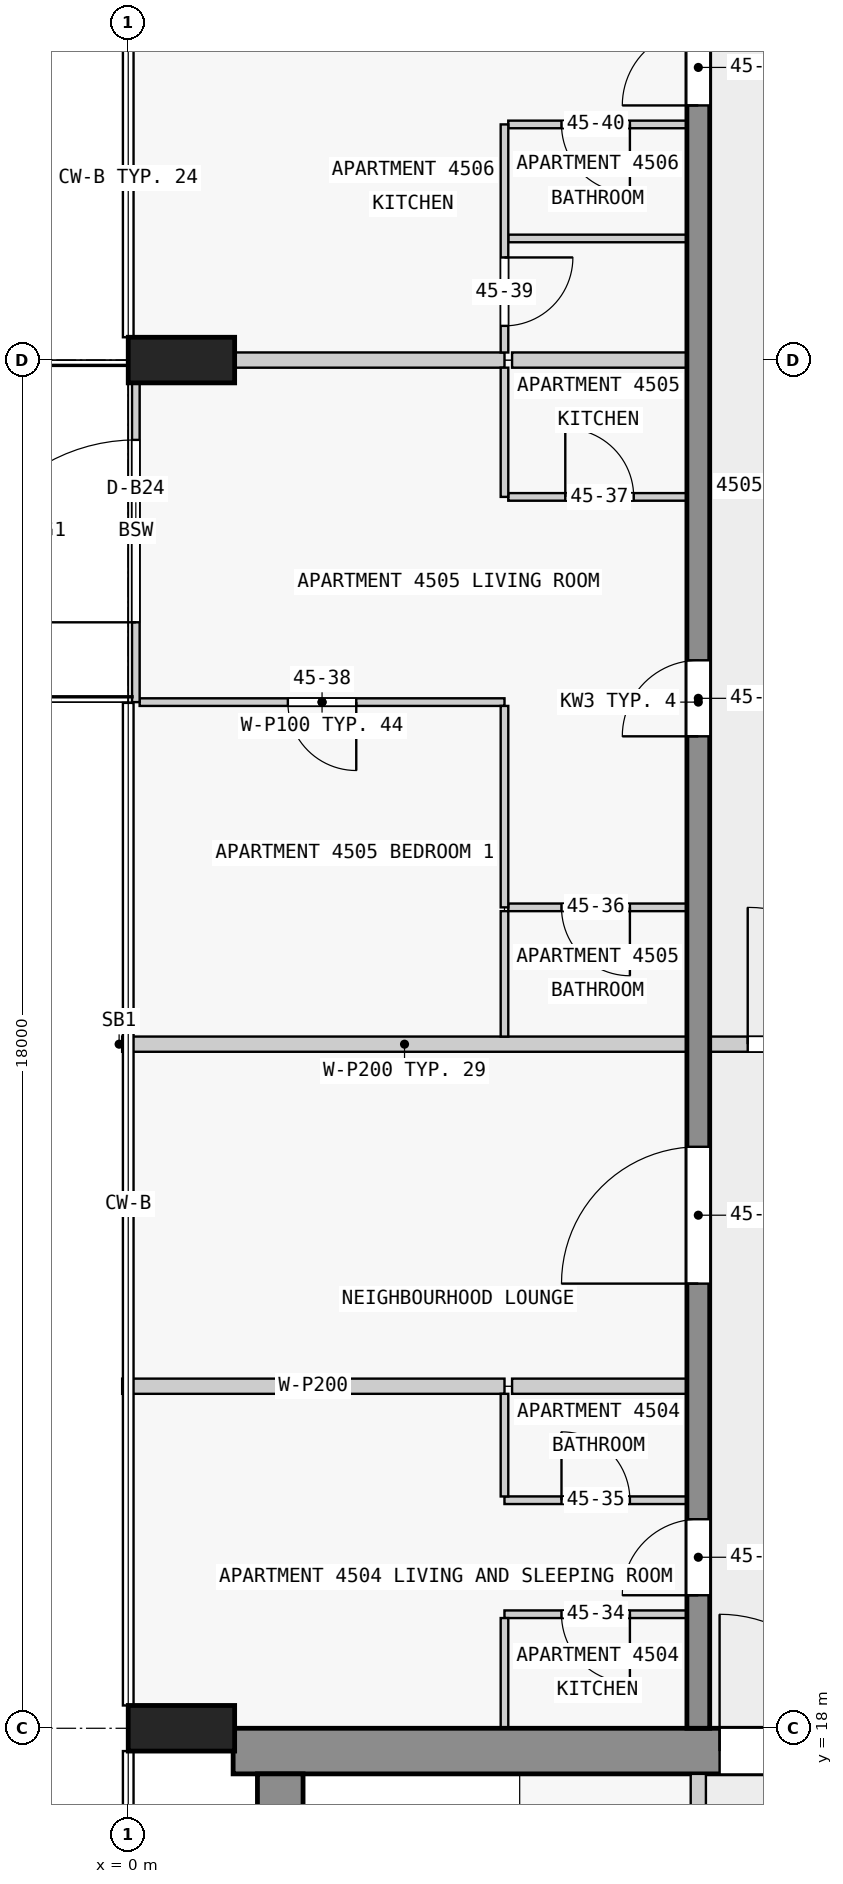
"""IFC4 building model, lengths in metres.
Left out: names, types, materials, properties, quantities, classifications, styles, units other than length and angle.
Written with IfcOpenShell. Run it as: python <this file> out.ifc"""

import sys

from ifc_helpers import new_model, si_unit, direction, frame, frame_2d, origin, origin_2d, place, context, subcontext, project, spatial, rectangle, extrude, element, fill, save


model = new_model("IFC4")
c1 = context("Model", 3, precision=1e-05, world=origin(), true_north=direction((0.0, 1.0)))
c2 = subcontext(c1, "Body", "Model", "MODEL_VIEW")
j1 = project(units=[si_unit("LENGTHUNIT", "METRE"), si_unit("PLANEANGLEUNIT", "RADIAN")], contexts=[c1])
p1 = place(None, origin())
s1 = spatial("IfcSite", under=j1, at=p1, CompositionType="ELEMENT")
p2 = place(p1, origin())
s2 = spatial("IfcBuilding", under=s1, at=p2, CompositionType="ELEMENT")
p3 = place(p2, frame((0.0, 0.0, 174.4)))
s3 = spatial("IfcBuildingStorey", under=s2, at=p3, CompositionType="ELEMENT", Elevation=174.4)
for number, where, z_axis, x_axis in (
    (1, (0.7, 36.0, 0.0), (0.0, 0.0, 1.0), (0.0, 1.0, 0.0)),
    (2, (0.7, 18.0, 0.0), (0.0, 0.0, 1.0), (0.0, 1.0, 0.0)),
):
    element("IfcColumn", number, at=place(p3, frame(where, z_axis=z_axis, x_axis=x_axis)), inside=s3, PredefinedType="COLUMN", context=c2, shape_type="SweptSolid", body=[
        extrude(rectangle(XDim=0.6, YDim=1.4, at=origin_2d()), origin(), (0.0, 0.0, 1.0), 3.5),
    ])
p4 = place(p3, frame((1.38, 17.7, 0.0), z_axis=(0.0, 0.0, 1.0), x_axis=(1.0, 0.0, 0.0)))
e3 = element("IfcWall", 3, at=p4, inside=s3, PredefinedType="SHEAR", context=c2, shape_type="SweptSolid", body=[
    extrude(rectangle(XDim=21.12, YDim=0.6, at=frame_2d((10.56, 0.0))), origin(), (0.0, 0.0, 1.0), 3.25),
])
p5 = place(p4, frame((6.4, 0.0, 0.0)))
e4 = element("IfcOpeningElement", 4, at=p5, cuts=e3, PredefinedType="OPENING", context=c2, shape_type="SweptSolid", body=[
    extrude(rectangle(XDim=1.8, YDim=2.1, at=frame_2d((0.9, 1.05))), frame((0.0, 0.31, 0.0), z_axis=(0.0, -1.0, 0.0), x_axis=(1.0, 0.0, 0.0)), (0.0, 0.0, 1.0), 0.62),
])
p6 = place(p3, frame((2.0, 2.5, 0.0), z_axis=(0.0, 0.0, 1.0), x_axis=(0.0, 1.0, 0.0)))
e5 = element("IfcWall", 5, at=p6, inside=s3, PredefinedType="SHEAR", context=c2, shape_type="SweptSolid", body=[
    extrude(rectangle(XDim=14.9, YDim=0.6, at=frame_2d((7.45, 0.0))), origin(), (0.0, 0.0, 1.0), 3.25),
])
p7 = place(p3, frame((7.5, 18.0, 0.0), z_axis=(0.0, 0.0, 1.0), x_axis=(0.0, 1.0, 0.0)))
e6 = element("IfcWall", 6, at=p7, inside=s3, PredefinedType="SHEAR", context=c2, shape_type="SweptSolid", body=[
    extrude(rectangle(XDim=27.0, YDim=0.3, at=frame_2d((13.5, 0.0))), origin(), (0.0, 0.0, 1.0), 3.25),
])
p8 = place(p7, frame((1.75, 0.0, 0.0)))
e7 = element("IfcOpeningElement", 7, at=p8, cuts=e6, PredefinedType="OPENING", context=c2, shape_type="SweptSolid", body=[
    extrude(rectangle(XDim=1.0, YDim=2.1, at=frame_2d((0.5, 1.05))), frame((0.0, 0.16, 0.0), z_axis=(0.0, -1.0, 0.0), x_axis=(1.0, 0.0, 0.0)), (0.0, 0.0, 1.0), 0.32),
])
p9 = place(p7, frame((5.85, 0.0, 0.0)))
e8 = element("IfcOpeningElement", 8, at=p9, cuts=e6, PredefinedType="OPENING", context=c2, shape_type="SweptSolid", body=[
    extrude(rectangle(XDim=1.8, YDim=2.1, at=frame_2d((0.9, 1.05))), frame((0.0, 0.16, 0.0), z_axis=(0.0, -1.0, 0.0), x_axis=(1.0, 0.0, 0.0)), (0.0, 0.0, 1.0), 0.32),
])
p10 = place(p7, frame((13.05, 0.0, 0.0)))
e9 = element("IfcOpeningElement", 9, at=p10, cuts=e6, PredefinedType="OPENING", context=c2, shape_type="SweptSolid", body=[
    extrude(rectangle(XDim=1.0, YDim=2.1, at=frame_2d((0.5, 1.05))), frame((0.0, 0.16, 0.0), z_axis=(0.0, -1.0, 0.0), x_axis=(1.0, 0.0, 0.0)), (0.0, 0.0, 1.0), 0.32),
])
p11 = place(p7, frame((21.35, 0.0, 0.0)))
e10 = element("IfcOpeningElement", 10, at=p11, cuts=e6, PredefinedType="OPENING", context=c2, shape_type="SweptSolid", body=[
    extrude(rectangle(XDim=1.0, YDim=2.1, at=frame_2d((0.5, 1.05))), frame((0.0, 0.16, 0.0), z_axis=(0.0, -1.0, 0.0), x_axis=(1.0, 0.0, 0.0)), (0.0, 0.0, 1.0), 0.32),
])
p12 = place(p3, frame((0.1, 31.5, 0.0), z_axis=(0.0, 0.0, 1.0), x_axis=(0.0, 1.0, 0.0)))
e11 = element("IfcWall", 11, at=p12, inside=s3, PredefinedType="STANDARD", context=c2, shape_type="SweptSolid", body=[
    extrude(rectangle(XDim=4.5, YDim=0.1, at=frame_2d((2.25, 0.0))), origin(), (0.0, 0.0, 1.0), 3.25),
])
p13 = place(p12, frame((1.05, 0.0, 0.0)))
e12 = element("IfcOpeningElement", 12, at=p13, cuts=e11, PredefinedType="OPENING", context=c2, shape_type="SweptSolid", body=[
    extrude(rectangle(XDim=2.4, YDim=2.4, at=frame_2d((1.2, 1.2))), frame((0.0, 0.06, 0.0), z_axis=(0.0, -1.0, 0.0), x_axis=(1.0, 0.0, 0.0)), (0.0, 0.0, 1.0), 0.12),
])
p14 = place(p3, frame((7.5, 10.1, 0.0), z_axis=(0.0, 0.0, 1.0), x_axis=(0.0, 1.0, 0.0)))
e13 = element("IfcWall", 13, at=p14, inside=s3, PredefinedType="PARTITIONING", context=c2, shape_type="SweptSolid", body=[
    extrude(rectangle(XDim=7.3, YDim=0.2, at=frame_2d((3.65, 0.0))), origin(), (0.0, 0.0, 1.0), 3.25),
])
p15 = place(p14, frame((0.775, 0.0, 0.0)))
e14 = element("IfcOpeningElement", 14, at=p15, cuts=e13, PredefinedType="OPENING", context=c2, shape_type="SweptSolid", body=[
    extrude(rectangle(XDim=0.9, YDim=2.1, at=frame_2d((0.45, 1.05))), frame((0.0, 0.11, 0.0), z_axis=(0.0, -1.0, 0.0), x_axis=(1.0, 0.0, 0.0)), (0.0, 0.0, 1.0), 0.22),
])
p16 = place(p14, frame((3.225, 0.0, 0.0)))
e15 = element("IfcOpeningElement", 15, at=p16, cuts=e13, PredefinedType="OPENING", context=c2, shape_type="SweptSolid", body=[
    extrude(rectangle(XDim=0.9, YDim=2.1, at=frame_2d((0.45, 1.05))), frame((0.0, 0.11, 0.0), z_axis=(0.0, -1.0, 0.0), x_axis=(1.0, 0.0, 0.0)), (0.0, 0.0, 1.0), 0.22),
])
p17 = place(p14, frame((5.25, 0.0, 0.0)))
e16 = element("IfcOpeningElement", 16, at=p17, cuts=e13, PredefinedType="OPENING", context=c2, shape_type="SweptSolid", body=[
    extrude(rectangle(XDim=0.9, YDim=2.1, at=frame_2d((0.45, 1.05))), frame((0.0, 0.11, 0.0), z_axis=(0.0, -1.0, 0.0), x_axis=(1.0, 0.0, 0.0)), (0.0, 0.0, 1.0), 0.22),
])
p18 = place(p3, frame((7.35, 19.5, 0.0), z_axis=(0.0, 0.0, 1.0), x_axis=(-1.0, 0.0, 0.0)))
e17 = element("IfcWall", 17, at=p18, inside=s3, PredefinedType="PARTITIONING", context=c2, shape_type="SweptSolid", body=[
    extrude(rectangle(XDim=2.4, YDim=0.1, at=frame_2d((1.2, 0.0))), origin(), (0.0, 0.0, 1.0), 3.25),
])
p19 = place(p18, frame((0.75, 0.0, 0.0)))
e18 = element("IfcOpeningElement", 18, at=p19, cuts=e17, PredefinedType="OPENING", context=c2, shape_type="SweptSolid", body=[
    extrude(rectangle(XDim=0.9, YDim=2.1, at=frame_2d((0.45, 1.05))), frame((0.0, 0.06, 0.0), z_axis=(0.0, -1.0, 0.0), x_axis=(1.0, 0.0, 0.0)), (0.0, 0.0, 1.0), 0.12),
])
p20 = place(p3, frame((4.95, 21.0, 0.0), z_axis=(0.0, 0.0, 1.0), x_axis=(1.0, 0.0, 0.0)))
e19 = element("IfcWall", 19, at=p20, inside=s3, PredefinedType="PARTITIONING", context=c2, shape_type="SweptSolid", body=[
    extrude(rectangle(XDim=2.4, YDim=0.1, at=frame_2d((1.2, 0.0))), origin(), (0.0, 0.0, 1.0), 3.25),
])
p21 = place(p20, frame((0.75, 0.0, 0.0)))
e20 = element("IfcOpeningElement", 20, at=p21, cuts=e19, PredefinedType="OPENING", context=c2, shape_type="SweptSolid", body=[
    extrude(rectangle(XDim=0.9, YDim=2.1, at=frame_2d((0.45, 1.05))), frame((0.0, 0.06, 0.0), z_axis=(0.0, -1.0, 0.0), x_axis=(1.0, 0.0, 0.0)), (0.0, 0.0, 1.0), 0.12),
])
p22 = place(p3, frame((7.35, 22.5, 0.0), z_axis=(0.0, 0.0, 1.0), x_axis=(-1.0, 0.0, 0.0)))
e21 = element("IfcWall", 21, at=p22, inside=s3, PredefinedType="PARTITIONING", context=c2, shape_type="SweptSolid", body=[
    extrude(rectangle(XDim=2.3, YDim=0.2, at=frame_2d((1.15, 0.0))), origin(), (0.0, 0.0, 1.0), 3.25),
])
p23 = place(p3, frame((-0.08, 22.5, 0.0), z_axis=(0.0, 0.0, 1.0), x_axis=(1.0, 0.0, 0.0)))
e22 = element("IfcWall", 22, at=p23, inside=s3, PredefinedType="PARTITIONING", context=c2, shape_type="SweptSolid", body=[
    extrude(rectangle(XDim=5.03, YDim=0.2, at=frame_2d((2.515, 0.0))), origin(), (0.0, 0.0, 1.0), 3.25),
])
p24 = place(p3, frame((7.35, 27.0, 0.0), z_axis=(0.0, 0.0, 1.0), x_axis=(-1.0, 0.0, 0.0)))
e23 = element("IfcWall", 23, at=p24, inside=s3, PredefinedType="PARTITIONING", context=c2, shape_type="SweptSolid", body=[
    extrude(rectangle(XDim=7.43, YDim=0.2, at=frame_2d((3.715, 0.0))), origin(), (0.0, 0.0, 1.0), 3.25),
])
p25 = place(p3, frame((7.35, 28.8, 0.0), z_axis=(0.0, 0.0, 1.0), x_axis=(-1.0, 0.0, 0.0)))
e24 = element("IfcWall", 24, at=p25, inside=s3, PredefinedType="PARTITIONING", context=c2, shape_type="SweptSolid", body=[
    extrude(rectangle(XDim=2.35, YDim=0.1, at=frame_2d((1.175, 0.0))), origin(), (0.0, 0.0, 1.0), 3.25),
])
p26 = place(p25, frame((0.75, 0.0, 0.0)))
e25 = element("IfcOpeningElement", 25, at=p26, cuts=e24, PredefinedType="OPENING", context=c2, shape_type="SweptSolid", body=[
    extrude(rectangle(XDim=0.9, YDim=2.1, at=frame_2d((0.45, 1.05))), frame((0.0, 0.06, 0.0), z_axis=(0.0, -1.0, 0.0), x_axis=(1.0, 0.0, 0.0)), (0.0, 0.0, 1.0), 0.12),
])
p27 = place(p3, frame((4.95, 31.5, 0.0), z_axis=(0.0, 0.0, 1.0), x_axis=(-1.0, 0.0, 0.0)))
e26 = element("IfcWall", 26, at=p27, inside=s3, PredefinedType="PARTITIONING", context=c2, shape_type="SweptSolid", body=[
    extrude(rectangle(XDim=4.8, YDim=0.1, at=frame_2d((2.4, 0.0))), origin(), (0.0, 0.0, 1.0), 3.25),
])
p28 = place(p27, frame((1.95, 0.0, 0.0)))
e27 = element("IfcOpeningElement", 27, at=p28, cuts=e26, PredefinedType="OPENING", context=c2, shape_type="SweptSolid", body=[
    extrude(rectangle(XDim=0.9, YDim=2.1, at=frame_2d((0.45, 1.05))), frame((0.0, 0.06, 0.0), z_axis=(0.0, -1.0, 0.0), x_axis=(1.0, 0.0, 0.0)), (0.0, 0.0, 1.0), 0.12),
])
p29 = place(p3, frame((5.0, 34.2, 0.0), z_axis=(0.0, 0.0, 1.0), x_axis=(1.0, 0.0, 0.0)))
e28 = element("IfcWall", 28, at=p29, inside=s3, PredefinedType="PARTITIONING", context=c2, shape_type="SweptSolid", body=[
    extrude(rectangle(XDim=2.35, YDim=0.1, at=frame_2d((1.175, 0.0))), origin(), (0.0, 0.0, 1.0), 3.25),
])
p30 = place(p29, frame((0.75, 0.0, 0.0)))
e29 = element("IfcOpeningElement", 29, at=p30, cuts=e28, PredefinedType="OPENING", context=c2, shape_type="SweptSolid", body=[
    extrude(rectangle(XDim=0.9, YDim=2.1, at=frame_2d((0.45, 1.05))), frame((0.0, 0.06, 0.0), z_axis=(0.0, -1.0, 0.0), x_axis=(1.0, 0.0, 0.0)), (0.0, 0.0, 1.0), 0.12),
])
p31 = place(p3, frame((7.35, 36.0, 0.0), z_axis=(0.0, 0.0, 1.0), x_axis=(-1.0, 0.0, 0.0)))
e30 = element("IfcWall", 30, at=p31, inside=s3, PredefinedType="PARTITIONING", context=c2, shape_type="SweptSolid", body=[
    extrude(rectangle(XDim=2.3, YDim=0.2, at=frame_2d((1.15, 0.0))), origin(), (0.0, 0.0, 1.0), 3.25),
])
p32 = place(p3, frame((1.4, 36.0, 0.0), z_axis=(0.0, 0.0, 1.0), x_axis=(1.0, 0.0, 0.0)))
e31 = element("IfcWall", 31, at=p32, inside=s3, PredefinedType="PARTITIONING", context=c2, shape_type="SweptSolid", body=[
    extrude(rectangle(XDim=3.55, YDim=0.2, at=frame_2d((1.775, 0.0))), origin(), (0.0, 0.0, 1.0), 3.25),
])
p33 = place(p3, frame((7.35, 37.6, 0.0), z_axis=(0.0, 0.0, 1.0), x_axis=(-1.0, 0.0, 0.0)))
e32 = element("IfcWall", 32, at=p33, inside=s3, PredefinedType="PARTITIONING", context=c2, shape_type="SweptSolid", body=[
    extrude(rectangle(XDim=2.35, YDim=0.1, at=frame_2d((1.175, 0.0))), origin(), (0.0, 0.0, 1.0), 3.25),
])
p34 = place(p3, frame((7.35, 39.1, 0.0), z_axis=(0.0, 0.0, 1.0), x_axis=(-1.0, 0.0, 0.0)))
e33 = element("IfcWall", 33, at=p34, inside=s3, PredefinedType="PARTITIONING", context=c2, shape_type="SweptSolid", body=[
    extrude(rectangle(XDim=2.35, YDim=0.1, at=frame_2d((1.175, 0.0))), origin(), (0.0, 0.0, 1.0), 3.25),
])
p35 = place(p34, frame((0.75, 0.0, 0.0)))
e34 = element("IfcOpeningElement", 34, at=p35, cuts=e33, PredefinedType="OPENING", context=c2, shape_type="SweptSolid", body=[
    extrude(rectangle(XDim=0.9, YDim=2.1, at=frame_2d((0.45, 1.05))), frame((0.0, 0.06, 0.0), z_axis=(0.0, -1.0, 0.0), x_axis=(1.0, 0.0, 0.0)), (0.0, 0.0, 1.0), 0.12),
])
p36 = place(p3, frame((4.95, 19.45, 0.0), z_axis=(0.0, 0.0, 1.0), x_axis=(0.0, -1.0, 0.0)))
e35 = element("IfcWall", 35, at=p36, inside=s3, PredefinedType="PARTITIONING", context=c2, shape_type="SweptSolid", body=[
    extrude(rectangle(XDim=1.45, YDim=0.1, at=frame_2d((0.725, 0.0))), origin(), (0.0, 0.0, 1.0), 3.25),
])
p37 = place(p3, frame((4.95, 22.4, 0.0), z_axis=(0.0, 0.0, 1.0), x_axis=(0.0, -1.0, 0.0)))
e36 = element("IfcWall", 36, at=p37, inside=s3, PredefinedType="PARTITIONING", context=c2, shape_type="SweptSolid", body=[
    extrude(rectangle(XDim=1.35, YDim=0.1, at=frame_2d((0.675, 0.0))), origin(), (0.0, 0.0, 1.0), 3.25),
])
p38 = place(p3, frame((4.95, 28.75, 0.0), z_axis=(0.0, 0.0, 1.0), x_axis=(0.0, -1.0, 0.0)))
e37 = element("IfcWall", 37, at=p38, inside=s3, PredefinedType="PARTITIONING", context=c2, shape_type="SweptSolid", body=[
    extrude(rectangle(XDim=1.65, YDim=0.1, at=frame_2d((0.825, 0.0))), origin(), (0.0, 0.0, 1.0), 3.25),
])
p39 = place(p3, frame((4.95, 35.9, 0.0), z_axis=(0.0, 0.0, 1.0), x_axis=(0.0, -1.0, 0.0)))
e38 = element("IfcWall", 38, at=p39, inside=s3, PredefinedType="PARTITIONING", context=c2, shape_type="SweptSolid", body=[
    extrude(rectangle(XDim=1.7, YDim=0.1, at=frame_2d((0.85, 0.0))), origin(), (0.0, 0.0, 1.0), 3.25),
])
p40 = place(p3, frame((4.95, 39.1, 0.0), z_axis=(0.0, 0.0, 1.0), x_axis=(0.0, -1.0, 0.0)))
e39 = element("IfcWall", 39, at=p40, inside=s3, PredefinedType="PARTITIONING", context=c2, shape_type="SweptSolid", body=[
    extrude(rectangle(XDim=3.0, YDim=0.1, at=frame_2d((1.5, 0.0))), origin(), (0.0, 0.0, 1.0), 3.25),
])
p41 = place(p40, frame((1.75, 0.0, 0.0)))
e40 = element("IfcOpeningElement", 40, at=p41, cuts=e39, PredefinedType="OPENING", context=c2, shape_type="SweptSolid", body=[
    extrude(rectangle(XDim=0.9, YDim=2.1, at=frame_2d((0.45, 1.05))), frame((0.0, 0.06, 0.0), z_axis=(0.0, -1.0, 0.0), x_axis=(1.0, 0.0, 0.0)), (0.0, 0.0, 1.0), 0.12),
])
p42 = place(p3, frame((4.95, 28.8, 0.0), z_axis=(0.0, 0.0, 1.0), x_axis=(0.0, 1.0, 0.0)))
e41 = element("IfcWall", 41, at=p42, inside=s3, PredefinedType="PARTITIONING", context=c2, shape_type="SweptSolid", body=[
    extrude(rectangle(XDim=2.65, YDim=0.1, at=frame_2d((1.325, 0.0))), origin(), (0.0, 0.0, 1.0), 3.25),
])
p43 = place(p3, frame((7.45, 27.0, 0.0), z_axis=(0.0, 0.0, 1.0), x_axis=(1.0, 0.0, 0.0)))
e42 = element("IfcWall", 42, at=p43, inside=s3, PredefinedType="PARTITIONING", context=c2, shape_type="SweptSolid", body=[
    extrude(rectangle(XDim=3.2, YDim=0.2, at=frame_2d((1.6, 0.0))), origin(), (0.0, 0.0, 1.0), 3.25),
])
p44 = place(p43, frame((0.7, 0.0, 0.0)))
e43 = element("IfcOpeningElement", 43, at=p44, cuts=e42, PredefinedType="OPENING", context=c2, shape_type="SweptSolid", body=[
    extrude(rectangle(XDim=1.8, YDim=2.1, at=frame_2d((0.9, 1.05))), frame((0.0, 0.11, 0.0), z_axis=(0.0, -1.0, 0.0), x_axis=(1.0, 0.0, 0.0)), (0.0, 0.0, 1.0), 0.22),
])
p45 = place(p13, origin())
e44 = element("IfcDoor", 44, at=p45, inside=s3, OperationType="SINGLE_SWING_LEFT", PredefinedType="DOOR", context=c2, shape_type="SweptSolid", body=[
    extrude(rectangle(XDim=2.4, YDim=2.4, at=frame_2d((1.2, 1.2))), frame((0.0, 0.025, 0.0), z_axis=(0.0, -1.0, 0.0), x_axis=(1.0, 0.0, 0.0)), (0.0, 0.0, 1.0), 0.05),
])
fill(e12, e44)
p46 = place(p5, origin())
e45 = element("IfcDoor", 45, at=p46, inside=s3, OperationType="DOUBLE_DOOR_SINGLE_SWING", PredefinedType="DOOR", context=c2, shape_type="SweptSolid", body=[
    extrude(rectangle(XDim=1.8, YDim=2.1, at=frame_2d((0.9, 1.05))), frame((0.0, 0.025, 0.0), z_axis=(0.0, -1.0, 0.0), x_axis=(1.0, 0.0, 0.0)), (0.0, 0.0, 1.0), 0.05),
])
fill(e4, e45)
p47 = place(p8, origin())
e46 = element("IfcDoor", 46, at=p47, inside=s3, OperationType="SINGLE_SWING_LEFT", PredefinedType="DOOR", context=c2, shape_type="SweptSolid", body=[
    extrude(rectangle(XDim=1.0, YDim=2.1, at=frame_2d((0.5, 1.05))), frame((0.0, 0.025, 0.0), z_axis=(0.0, -1.0, 0.0), x_axis=(1.0, 0.0, 0.0)), (0.0, 0.0, 1.0), 0.05),
])
fill(e7, e46)
p48 = place(p9, origin())
e47 = element("IfcDoor", 47, at=p48, inside=s3, OperationType="SINGLE_SWING_LEFT", PredefinedType="DOOR", context=c2, shape_type="SweptSolid", body=[
    extrude(rectangle(XDim=1.8, YDim=2.1, at=frame_2d((0.9, 1.05))), frame((0.0, 0.025, 0.0), z_axis=(0.0, -1.0, 0.0), x_axis=(1.0, 0.0, 0.0)), (0.0, 0.0, 1.0), 0.05),
])
fill(e8, e47)
p49 = place(p10, origin())
e48 = element("IfcDoor", 48, at=p49, inside=s3, OperationType="SINGLE_SWING_RIGHT", PredefinedType="DOOR", context=c2, shape_type="SweptSolid", body=[
    extrude(rectangle(XDim=1.0, YDim=2.1, at=frame_2d((0.5, 1.05))), frame((0.0, 0.025, 0.0), z_axis=(0.0, -1.0, 0.0), x_axis=(1.0, 0.0, 0.0)), (0.0, 0.0, 1.0), 0.05),
])
fill(e9, e48)
p50 = place(p11, origin())
e49 = element("IfcDoor", 49, at=p50, inside=s3, OperationType="SINGLE_SWING_RIGHT", PredefinedType="DOOR", context=c2, shape_type="SweptSolid", body=[
    extrude(rectangle(XDim=1.0, YDim=2.1, at=frame_2d((0.5, 1.05))), frame((0.0, 0.025, 0.0), z_axis=(0.0, -1.0, 0.0), x_axis=(1.0, 0.0, 0.0)), (0.0, 0.0, 1.0), 0.05),
])
fill(e10, e49)
p51 = place(p44, origin())
e50 = element("IfcDoor", 50, at=p51, inside=s3, OperationType="SINGLE_SWING_LEFT", PredefinedType="DOOR", context=c2, shape_type="SweptSolid", body=[
    extrude(rectangle(XDim=1.8, YDim=2.1, at=frame_2d((0.9, 1.05))), frame((0.0, 0.025, 0.0), z_axis=(0.0, -1.0, 0.0), x_axis=(1.0, 0.0, 0.0)), (0.0, 0.0, 1.0), 0.05),
])
fill(e43, e50)
p52 = place(p19, origin())
e51 = element("IfcDoor", 51, at=p52, inside=s3, OperationType="SINGLE_SWING_RIGHT", PredefinedType="DOOR", context=c2, shape_type="SweptSolid", body=[
    extrude(rectangle(XDim=0.9, YDim=2.1, at=frame_2d((0.45, 1.05))), frame((0.0, 0.025, 0.0), z_axis=(0.0, -1.0, 0.0), x_axis=(1.0, 0.0, 0.0)), (0.0, 0.0, 1.0), 0.05),
])
fill(e18, e51)
p53 = place(p21, origin())
e52 = element("IfcDoor", 52, at=p53, inside=s3, OperationType="SINGLE_SWING_RIGHT", PredefinedType="DOOR", context=c2, shape_type="SweptSolid", body=[
    extrude(rectangle(XDim=0.9, YDim=2.1, at=frame_2d((0.45, 1.05))), frame((0.0, 0.025, 0.0), z_axis=(0.0, -1.0, 0.0), x_axis=(1.0, 0.0, 0.0)), (0.0, 0.0, 1.0), 0.05),
])
fill(e20, e52)
p54 = place(p26, origin())
e53 = element("IfcDoor", 53, at=p54, inside=s3, OperationType="SINGLE_SWING_RIGHT", PredefinedType="DOOR", context=c2, shape_type="SweptSolid", body=[
    extrude(rectangle(XDim=0.9, YDim=2.1, at=frame_2d((0.45, 1.05))), frame((0.0, 0.025, 0.0), z_axis=(0.0, -1.0, 0.0), x_axis=(1.0, 0.0, 0.0)), (0.0, 0.0, 1.0), 0.05),
])
fill(e25, e53)
p55 = place(p30, origin())
e54 = element("IfcDoor", 54, at=p55, inside=s3, OperationType="SINGLE_SWING_RIGHT", PredefinedType="DOOR", context=c2, shape_type="SweptSolid", body=[
    extrude(rectangle(XDim=0.9, YDim=2.1, at=frame_2d((0.45, 1.05))), frame((0.0, 0.025, 0.0), z_axis=(0.0, -1.0, 0.0), x_axis=(1.0, 0.0, 0.0)), (0.0, 0.0, 1.0), 0.05),
])
fill(e29, e54)
p56 = place(p28, origin())
e55 = element("IfcDoor", 55, at=p56, inside=s3, OperationType="SINGLE_SWING_LEFT", PredefinedType="DOOR", context=c2, shape_type="SweptSolid", body=[
    extrude(rectangle(XDim=0.9, YDim=2.1, at=frame_2d((0.45, 1.05))), frame((0.0, 0.025, 0.0), z_axis=(0.0, -1.0, 0.0), x_axis=(1.0, 0.0, 0.0)), (0.0, 0.0, 1.0), 0.05),
])
fill(e27, e55)
p57 = place(p41, origin())
e56 = element("IfcDoor", 56, at=p57, inside=s3, OperationType="SINGLE_SWING_RIGHT", PredefinedType="DOOR", context=c2, shape_type="SweptSolid", body=[
    extrude(rectangle(XDim=0.9, YDim=2.1, at=frame_2d((0.45, 1.05))), frame((0.0, 0.025, 0.0), z_axis=(0.0, -1.0, 0.0), x_axis=(1.0, 0.0, 0.0)), (0.0, 0.0, 1.0), 0.05),
])
fill(e40, e56)
p58 = place(p35, origin())
e57 = element("IfcDoor", 57, at=p58, inside=s3, OperationType="SINGLE_SWING_RIGHT", PredefinedType="DOOR", context=c2, shape_type="SweptSolid", body=[
    extrude(rectangle(XDim=0.9, YDim=2.1, at=frame_2d((0.45, 1.05))), frame((0.0, 0.025, 0.0), z_axis=(0.0, -1.0, 0.0), x_axis=(1.0, 0.0, 0.0)), (0.0, 0.0, 1.0), 0.05),
])
fill(e34, e57)
save(model, sys.argv[1])
